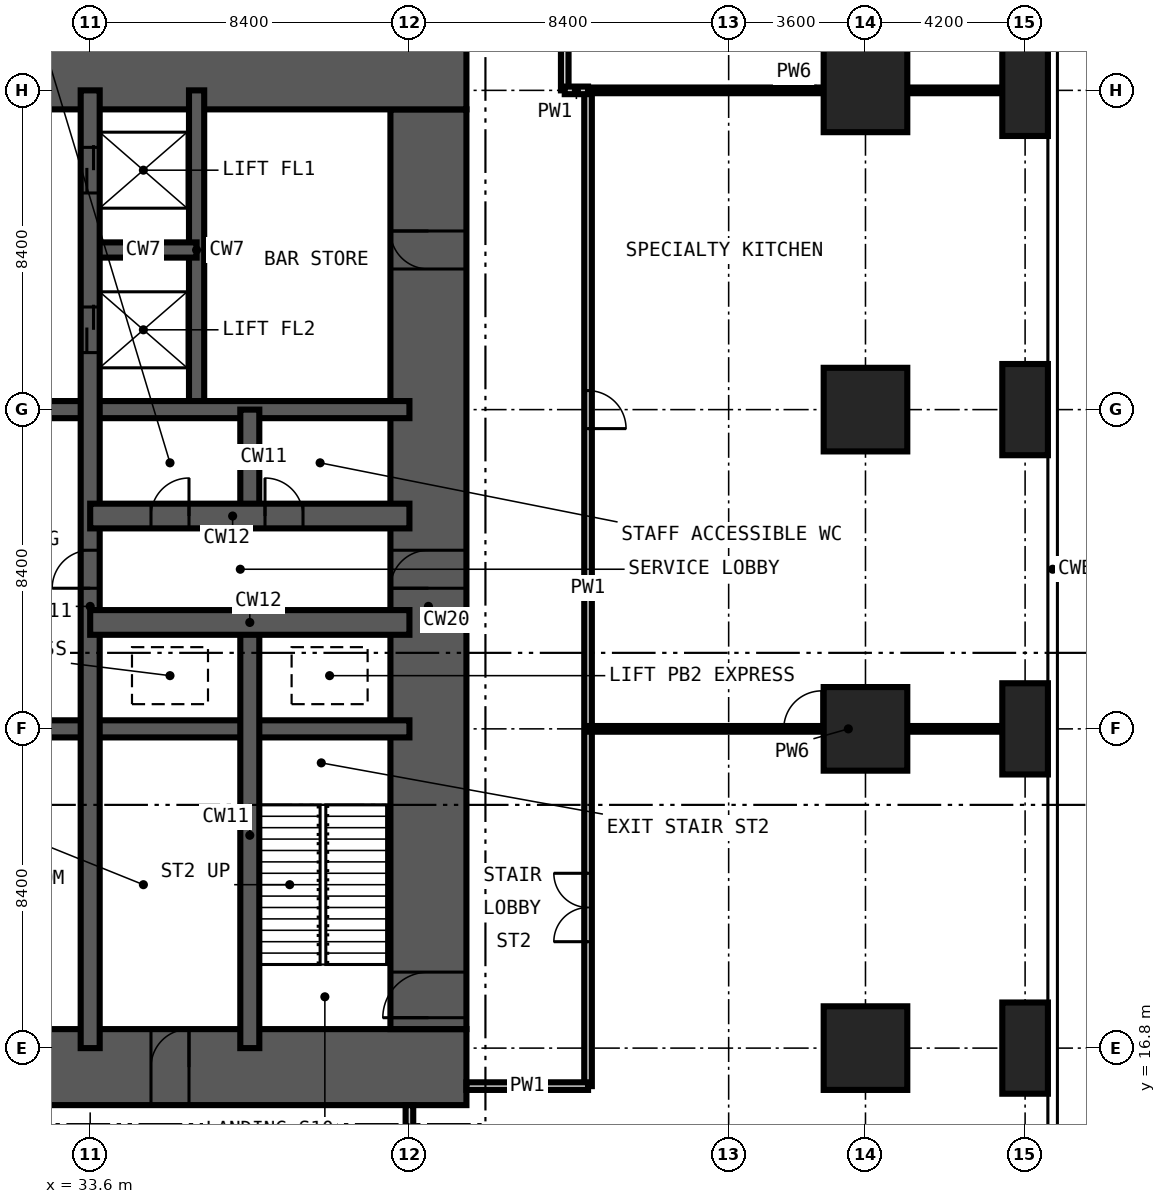
"""IFC4 building model, lengths in metres.
Left out: names, types, materials, properties, quantities, classifications, styles, units other than length and angle.
Written with IfcOpenShell. Run it as: python <this file> out.ifc"""

import sys

from ifc_helpers import new_model, si_unit, direction, frame, frame_2d, origin, origin_2d, place, context, subcontext, project, spatial, rectangle, extrude, element, fill, save


model = new_model("IFC4")
c1 = context("Model", 3, precision=1e-05, world=origin(), true_north=direction((0.0, 1.0)))
c2 = subcontext(c1, "Body", "Model", "MODEL_VIEW")
j1 = project(units=[si_unit("LENGTHUNIT", "METRE"), si_unit("PLANEANGLEUNIT", "RADIAN")], contexts=[c1])
p1 = place(None, origin())
s1 = spatial("IfcSite", under=j1, at=p1, CompositionType="ELEMENT")
p2 = place(p1, origin())
s2 = spatial("IfcBuilding", under=s1, at=p2, CompositionType="ELEMENT")
p3 = place(p2, frame((0.0, 0.0, 17.0)))
s3 = spatial("IfcBuildingStorey", under=s2, at=p3, CompositionType="ELEMENT", Elevation=17.0)
for number, where, z_axis, x_axis in (
    (1, (54.0, 16.8, -0.3), (0.0, 0.0, 1.0), (1.0, 0.0, 0.0)),
    (2, (54.0, 25.2, -0.3), (0.0, 0.0, 1.0), (1.0, 0.0, 0.0)),
    (3, (54.0, 33.6, -0.3), (0.0, 0.0, 1.0), (1.0, 0.0, 0.0)),
    (4, (54.0, 42.0, -0.3), (0.0, 0.0, 1.0), (1.0, 0.0, 0.0)),
):
    element("IfcColumn", number, at=place(p3, frame(where, z_axis=z_axis, x_axis=x_axis)), inside=s3, PredefinedType="COLUMN", context=c2, shape_type="SweptSolid", body=[
        extrude(rectangle(XDim=2.2, YDim=2.2, at=origin_2d()), origin(), (0.0, 0.0, 1.0), 4.95),
    ])
for number, where, z_axis, x_axis in (
    (5, (58.2, 16.8, -0.3), (0.0, 0.0, 1.0), (1.0, 0.0, 0.0)),
    (6, (58.2, 25.2, -0.3), (0.0, 0.0, 1.0), (1.0, 0.0, 0.0)),
    (7, (58.2, 33.6, -0.3), (0.0, 0.0, 1.0), (1.0, 0.0, 0.0)),
    (8, (58.2, 42.0, -0.3), (0.0, 0.0, 1.0), (1.0, 0.0, 0.0)),
):
    element("IfcColumn", number, at=place(p3, frame(where, z_axis=z_axis, x_axis=x_axis)), inside=s3, PredefinedType="COLUMN", context=c2, shape_type="SweptSolid", body=[
        extrude(rectangle(XDim=1.2, YDim=2.4, at=origin_2d()), origin(), (0.0, 0.0, 1.0), 4.95),
    ])
p4 = place(p3, frame((15.3, 16.3, -0.3), z_axis=(0.0, 0.0, 1.0), x_axis=(1.0, 0.0, 0.0)))
e9 = element("IfcWall", 9, at=p4, inside=s3, PredefinedType="SHEAR", context=c2, shape_type="SweptSolid", body=[
    extrude(rectangle(XDim=28.2, YDim=2.0, at=frame_2d((14.1, 0.0))), origin(), (0.0, 0.0, 1.0), 4.95),
])
p5 = place(p4, frame((13.6, 0.0, 0.3)))
e10 = element("IfcOpeningElement", 10, at=p5, cuts=e9, PredefinedType="OPENING", context=c2, shape_type="SweptSolid", body=[
    extrude(rectangle(XDim=1.0, YDim=2.1, at=frame_2d((0.5, 1.05))), frame((0.0, 1.01, 0.0), z_axis=(0.0, -1.0, 0.0), x_axis=(1.0, 0.0, 0.0)), (0.0, 0.0, 1.0), 2.02),
])
p6 = place(p4, frame((19.9, 0.0, 0.3)))
e11 = element("IfcOpeningElement", 11, at=p6, cuts=e9, PredefinedType="OPENING", context=c2, shape_type="SweptSolid", body=[
    extrude(rectangle(XDim=1.0, YDim=2.1, at=frame_2d((0.5, 1.05))), frame((0.0, 1.01, 0.0), z_axis=(0.0, -1.0, 0.0), x_axis=(1.0, 0.0, 0.0)), (0.0, 0.0, 1.0), 2.02),
])
p7 = place(p3, frame((42.5, 17.3, -0.3), z_axis=(0.0, 0.0, 1.0), x_axis=(0.0, 1.0, 0.0)))
e12 = element("IfcWall", 12, at=p7, inside=s3, PredefinedType="SHEAR", context=c2, shape_type="SweptSolid", body=[
    extrude(rectangle(XDim=24.2, YDim=2.0, at=frame_2d((12.1, 0.0))), origin(), (0.0, 0.0, 1.0), 4.95),
])
p8 = place(p7, frame((0.3, 0.0, 0.3)))
e13 = element("IfcOpeningElement", 13, at=p8, cuts=e12, PredefinedType="OPENING", context=c2, shape_type="SweptSolid", body=[
    extrude(rectangle(XDim=1.2, YDim=2.2, at=frame_2d((0.6, 1.1))), frame((0.0, 1.01, 0.0), z_axis=(0.0, -1.0, 0.0), x_axis=(1.0, 0.0, 0.0)), (0.0, 0.0, 1.0), 2.02),
])
p9 = place(p7, frame((11.6, 0.0, 0.3)))
e14 = element("IfcOpeningElement", 14, at=p9, cuts=e12, PredefinedType="OPENING", context=c2, shape_type="SweptSolid", body=[
    extrude(rectangle(XDim=1.0, YDim=2.1, at=frame_2d((0.5, 1.05))), frame((0.0, 1.01, 0.0), z_axis=(0.0, -1.0, 0.0), x_axis=(1.0, 0.0, 0.0)), (0.0, 0.0, 1.0), 2.02),
])
p10 = place(p7, frame((20.0, 0.0, 0.3)))
e15 = element("IfcOpeningElement", 15, at=p10, cuts=e12, PredefinedType="OPENING", context=c2, shape_type="SweptSolid", body=[
    extrude(rectangle(XDim=1.0, YDim=2.1, at=frame_2d((0.5, 1.05))), frame((0.0, 1.01, 0.0), z_axis=(0.0, -1.0, 0.0), x_axis=(1.0, 0.0, 0.0)), (0.0, 0.0, 1.0), 2.02),
])
p11 = place(p3, frame((43.5, 42.5, -0.3), z_axis=(0.0, 0.0, 1.0), x_axis=(-1.0, 0.0, 0.0)))
e16 = element("IfcWall", 16, at=p11, inside=s3, PredefinedType="SHEAR", context=c2, shape_type="SweptSolid", body=[
    extrude(rectangle(XDim=28.2, YDim=2.0, at=frame_2d((14.1, 0.0))), origin(), (0.0, 0.0, 1.0), 4.95),
])
p12 = place(p11, frame((22.0, 0.0, 0.3)))
e17 = element("IfcOpeningElement", 17, at=p12, cuts=e16, PredefinedType="OPENING", context=c2, shape_type="SweptSolid", body=[
    extrude(rectangle(XDim=1.0, YDim=2.1, at=frame_2d((0.5, 1.05))), frame((0.0, 1.01, 0.0), z_axis=(0.0, -1.0, 0.0), x_axis=(1.0, 0.0, 0.0)), (0.0, 0.0, 1.0), 2.02),
])
p13 = place(p11, frame((11.4, 0.0, 0.3)))
e18 = element("IfcOpeningElement", 18, at=p13, cuts=e16, PredefinedType="OPENING", context=c2, shape_type="SweptSolid", body=[
    extrude(rectangle(XDim=1.2, YDim=2.2, at=frame_2d((0.6, 1.1))), frame((0.0, 1.01, 0.0), z_axis=(0.0, -1.0, 0.0), x_axis=(1.0, 0.0, 0.0)), (0.0, 0.0, 1.0), 2.02),
])
p14 = place(p3, frame((36.4, 33.6, -0.3), z_axis=(0.0, 0.0, 1.0), x_axis=(0.0, 1.0, 0.0)))
e19 = element("IfcWall", 19, at=p14, inside=s3, PredefinedType="SHEAR", context=c2, shape_type="SweptSolid", body=[
    extrude(rectangle(XDim=8.4, YDim=0.4, at=frame_2d((4.2, 0.0))), origin(), (0.0, 0.0, 1.0), 4.95),
])
p15 = place(p3, frame((33.6, 37.8, -0.3), z_axis=(0.0, 0.0, 1.0), x_axis=(1.0, 0.0, 0.0)))
e20 = element("IfcWall", 20, at=p15, inside=s3, PredefinedType="SHEAR", context=c2, shape_type="SweptSolid", body=[
    extrude(rectangle(XDim=2.8, YDim=0.4, at=frame_2d((1.4, 0.0))), origin(), (0.0, 0.0, 1.0), 4.95),
])
for number, where, z_axis, x_axis in (
    (21, (16.8, 25.2, -0.3), (0.0, 0.0, 1.0), (1.0, 0.0, 0.0)),
    (22, (16.8, 33.6, -0.3), (0.0, 0.0, 1.0), (1.0, 0.0, 0.0)),
):
    element("IfcWall", number, at=place(p3, frame(where, z_axis=z_axis, x_axis=x_axis)), inside=s3, PredefinedType="SHEAR", context=c2, shape_type="SweptSolid", body=[
        extrude(rectangle(XDim=25.2, YDim=0.45, at=frame_2d((12.6, 0.0))), origin(), (0.0, 0.0, 1.0), 4.95),
    ])
p16 = place(p3, frame((33.6, 16.8, -0.3), z_axis=(0.0, 0.0, 1.0), x_axis=(0.0, 1.0, 0.0)))
e23 = element("IfcWall", 23, at=p16, inside=s3, PredefinedType="SHEAR", context=c2, shape_type="SweptSolid", body=[
    extrude(rectangle(XDim=25.2, YDim=0.5, at=frame_2d((12.6, 0.0))), origin(), (0.0, 0.0, 1.0), 4.95),
])
p17 = place(p16, frame((22.5, 0.0, 0.3)))
e24 = element("IfcOpeningElement", 24, at=p17, cuts=e23, PredefinedType="OPENING", context=c2, shape_type="SweptSolid", body=[
    extrude(rectangle(XDim=1.2, YDim=2.2, at=frame_2d((0.6, 1.1))), frame((0.0, 0.26, 0.0), z_axis=(0.0, -1.0, 0.0), x_axis=(1.0, 0.0, 0.0)), (0.0, 0.0, 1.0), 0.52),
])
p18 = place(p16, frame((18.3, 0.0, 0.3)))
e25 = element("IfcOpeningElement", 25, at=p18, cuts=e23, PredefinedType="OPENING", context=c2, shape_type="SweptSolid", body=[
    extrude(rectangle(XDim=1.2, YDim=2.2, at=frame_2d((0.6, 1.1))), frame((0.0, 0.26, 0.0), z_axis=(0.0, -1.0, 0.0), x_axis=(1.0, 0.0, 0.0)), (0.0, 0.0, 1.0), 0.52),
])
p19 = place(p16, frame((12.1, 0.0, 0.3)))
e26 = element("IfcOpeningElement", 26, at=p19, cuts=e23, PredefinedType="OPENING", context=c2, shape_type="SweptSolid", body=[
    extrude(rectangle(XDim=1.0, YDim=2.1, at=frame_2d((0.5, 1.05))), frame((0.0, 0.26, 0.0), z_axis=(0.0, -1.0, 0.0), x_axis=(1.0, 0.0, 0.0)), (0.0, 0.0, 1.0), 0.52),
])
p20 = place(p3, frame((37.8, 16.8, -0.3), z_axis=(0.0, 0.0, 1.0), x_axis=(0.0, 1.0, 0.0)))
e27 = element("IfcWall", 27, at=p20, inside=s3, PredefinedType="SHEAR", context=c2, shape_type="SweptSolid", body=[
    extrude(rectangle(XDim=11.2, YDim=0.5, at=frame_2d((5.6, 0.0))), origin(), (0.0, 0.0, 1.0), 4.95),
])
p21 = place(p3, frame((37.8, 30.8, -0.3), z_axis=(0.0, 0.0, 1.0), x_axis=(0.0, 1.0, 0.0)))
e28 = element("IfcWall", 28, at=p21, inside=s3, PredefinedType="SHEAR", context=c2, shape_type="SweptSolid", body=[
    extrude(rectangle(XDim=2.8, YDim=0.5, at=frame_2d((1.4, 0.0))), origin(), (0.0, 0.0, 1.0), 4.95),
])
p22 = place(p3, frame((33.6, 28.0, -0.3), z_axis=(0.0, 0.0, 1.0), x_axis=(1.0, 0.0, 0.0)))
e29 = element("IfcWall", 29, at=p22, inside=s3, PredefinedType="SHEAR", context=c2, shape_type="SweptSolid", body=[
    extrude(rectangle(XDim=8.4, YDim=0.65, at=frame_2d((4.2, 0.0))), origin(), (0.0, 0.0, 1.0), 4.95),
])
p23 = place(p3, frame((33.6, 30.8, -0.3), z_axis=(0.0, 0.0, 1.0), x_axis=(1.0, 0.0, 0.0)))
e30 = element("IfcWall", 30, at=p23, inside=s3, PredefinedType="SHEAR", context=c2, shape_type="SweptSolid", body=[
    extrude(rectangle(XDim=8.4, YDim=0.65, at=frame_2d((4.2, 0.0))), origin(), (0.0, 0.0, 1.0), 4.95),
])
p24 = place(p23, frame((1.6, 0.0, 0.3)))
e31 = element("IfcOpeningElement", 31, at=p24, cuts=e30, PredefinedType="OPENING", context=c2, shape_type="SweptSolid", body=[
    extrude(rectangle(XDim=1.0, YDim=2.1, at=frame_2d((0.5, 1.05))), frame((0.0, 0.335, 0.0), z_axis=(0.0, -1.0, 0.0), x_axis=(1.0, 0.0, 0.0)), (0.0, 0.0, 1.0), 0.67),
])
p25 = place(p23, frame((4.6, 0.0, 0.3)))
e32 = element("IfcOpeningElement", 32, at=p25, cuts=e30, PredefinedType="OPENING", context=c2, shape_type="SweptSolid", body=[
    extrude(rectangle(XDim=1.0, YDim=2.1, at=frame_2d((0.5, 1.05))), frame((0.0, 0.335, 0.0), z_axis=(0.0, -1.0, 0.0), x_axis=(1.0, 0.0, 0.0)), (0.0, 0.0, 1.0), 0.67),
])
p26 = place(p3, frame((42.0, 12.1, 0.0), z_axis=(0.0, 0.0, 1.0), x_axis=(0.0, 1.0, 0.0)))
e33 = element("IfcWall", 33, at=p26, inside=s3, PredefinedType="PARTITIONING", context=c2, shape_type="SweptSolid", body=[
    extrude(rectangle(XDim=3.2, YDim=0.2, at=frame_2d((1.6, 0.0))), origin(), (0.0, 0.0, 1.0), 4.65),
])
p27 = place(p3, frame((46.087, 42.0, 0.0), z_axis=(0.0, 0.0, 1.0), x_axis=(0.0, 1.0, 0.0)))
e34 = element("IfcWall", 34, at=p27, inside=s3, PredefinedType="PARTITIONING", context=c2, shape_type="SweptSolid", body=[
    extrude(rectangle(XDim=4.7, YDim=0.2, at=frame_2d((2.35, 0.0))), origin(), (0.0, 0.0, 1.0), 4.65),
])
p28 = place(p27, frame((1.45, 0.0, 0.0)))
e35 = element("IfcOpeningElement", 35, at=p28, cuts=e34, PredefinedType="OPENING", context=c2, shape_type="SweptSolid", body=[
    extrude(rectangle(XDim=1.8, YDim=2.4, at=frame_2d((0.9, 1.2))), frame((0.0, 0.11, 0.0), z_axis=(0.0, -1.0, 0.0), x_axis=(1.0, 0.0, 0.0)), (0.0, 0.0, 1.0), 0.22),
])
p29 = place(p3, frame((46.7, 15.8, 0.0), z_axis=(0.0, 0.0, 1.0), x_axis=(0.0, 1.0, 0.0)))
e36 = element("IfcWall", 36, at=p29, inside=s3, PredefinedType="PARTITIONING", context=c2, shape_type="SweptSolid", body=[
    extrude(rectangle(XDim=26.2, YDim=0.2, at=frame_2d((13.1, 0.0))), origin(), (0.0, 0.0, 1.0), 4.65),
])
p30 = place(p29, frame((3.8, 0.0, 0.0)))
e37 = element("IfcOpeningElement", 37, at=p30, cuts=e36, PredefinedType="OPENING", context=c2, shape_type="SweptSolid", body=[
    extrude(rectangle(XDim=1.8, YDim=2.4, at=frame_2d((0.9, 1.2))), frame((0.0, 0.11, 0.0), z_axis=(0.0, -1.0, 0.0), x_axis=(1.0, 0.0, 0.0)), (0.0, 0.0, 1.0), 0.22),
])
p31 = place(p29, frame((17.3, 0.0, 0.0)))
e38 = element("IfcOpeningElement", 38, at=p31, cuts=e36, PredefinedType="OPENING", context=c2, shape_type="SweptSolid", body=[
    extrude(rectangle(XDim=1.0, YDim=2.1, at=frame_2d((0.5, 1.05))), frame((0.0, 0.11, 0.0), z_axis=(0.0, -1.0, 0.0), x_axis=(1.0, 0.0, 0.0)), (0.0, 0.0, 1.0), 0.22),
])
p32 = place(p3, frame((43.5, 15.8, 0.0), z_axis=(0.0, 0.0, 1.0), x_axis=(1.0, 0.0, 0.0)))
e39 = element("IfcWall", 39, at=p32, inside=s3, PredefinedType="PARTITIONING", context=c2, shape_type="SweptSolid", body=[
    extrude(rectangle(XDim=3.2, YDim=0.2, at=frame_2d((1.6, 0.0))), origin(), (0.0, 0.0, 1.0), 4.65),
])
p33 = place(p3, frame((46.7, 42.0, 0.0), z_axis=(0.0, 0.0, 1.0), x_axis=(-1.0, 0.0, 0.0)))
e40 = element("IfcWall", 40, at=p33, inside=s3, PredefinedType="PARTITIONING", context=c2, shape_type="SweptSolid", body=[
    extrude(rectangle(XDim=0.613, YDim=0.2, at=frame_2d((0.307, 0.0))), origin(), (0.0, 0.0, 1.0), 4.65),
])
p34 = place(p3, frame((46.7, 25.2, 0.0), z_axis=(0.0, 0.0, 1.0), x_axis=(1.0, 0.0, 0.0)))
e41 = element("IfcWall", 41, at=p34, inside=s3, PredefinedType="PARTITIONING", context=c2, shape_type="SweptSolid", body=[
    extrude(rectangle(XDim=12.1, YDim=0.15, at=frame_2d((6.05, 0.0))), origin(), (0.0, 0.0, 1.0), 4.65),
])
p35 = place(p34, frame((5.15, 0.0, 0.0)))
e42 = element("IfcOpeningElement", 42, at=p35, cuts=e41, PredefinedType="OPENING", context=c2, shape_type="SweptSolid", body=[
    extrude(rectangle(XDim=1.0, YDim=2.1, at=frame_2d((0.5, 1.05))), frame((0.0, 0.085, 0.0), z_axis=(0.0, -1.0, 0.0), x_axis=(1.0, 0.0, 0.0)), (0.0, 0.0, 1.0), 0.17),
])
p36 = place(p3, frame((46.7, 42.0, 0.0), z_axis=(0.0, 0.0, 1.0), x_axis=(1.0, 0.0, 0.0)))
e43 = element("IfcWall", 43, at=p36, inside=s3, PredefinedType="PARTITIONING", context=c2, shape_type="SweptSolid", body=[
    extrude(rectangle(XDim=12.1, YDim=0.15, at=frame_2d((6.05, 0.0))), origin(), (0.0, 0.0, 1.0), 4.65),
])
p37 = place(p8, origin())
e44 = element("IfcDoor", 44, at=p37, inside=s3, OperationType="SINGLE_SWING_LEFT", PredefinedType="DOOR", context=c2, shape_type="SweptSolid", body=[
    extrude(rectangle(XDim=1.2, YDim=2.2, at=frame_2d((0.6, 1.1))), frame((0.0, 0.025, 0.0), z_axis=(0.0, -1.0, 0.0), x_axis=(1.0, 0.0, 0.0)), (0.0, 0.0, 1.0), 0.05),
])
fill(e13, e44)
p38 = place(p17, origin())
e45 = element("IfcDoor", 45, at=p38, inside=s3, OperationType="DOUBLE_DOOR_SLIDING", PredefinedType="DOOR", context=c2, shape_type="SweptSolid", body=[
    extrude(rectangle(XDim=1.2, YDim=2.2, at=frame_2d((0.6, 1.1))), frame((0.0, 0.025, 0.0), z_axis=(0.0, -1.0, 0.0), x_axis=(1.0, 0.0, 0.0)), (0.0, 0.0, 1.0), 0.05),
])
fill(e24, e45)
p39 = place(p18, origin())
e46 = element("IfcDoor", 46, at=p39, inside=s3, OperationType="DOUBLE_DOOR_SLIDING", PredefinedType="DOOR", context=c2, shape_type="SweptSolid", body=[
    extrude(rectangle(XDim=1.2, YDim=2.2, at=frame_2d((0.6, 1.1))), frame((0.0, 0.025, 0.0), z_axis=(0.0, -1.0, 0.0), x_axis=(1.0, 0.0, 0.0)), (0.0, 0.0, 1.0), 0.05),
])
fill(e25, e46)
p40 = place(p19, origin())
e47 = element("IfcDoor", 47, at=p40, inside=s3, OperationType="SINGLE_SWING_LEFT", PredefinedType="DOOR", context=c2, shape_type="SweptSolid", body=[
    extrude(rectangle(XDim=1.0, YDim=2.1, at=frame_2d((0.5, 1.05))), frame((0.0, 0.025, 0.0), z_axis=(0.0, -1.0, 0.0), x_axis=(1.0, 0.0, 0.0)), (0.0, 0.0, 1.0), 0.05),
])
fill(e26, e47)
p41 = place(p24, origin())
e48 = element("IfcDoor", 48, at=p41, inside=s3, OperationType="SINGLE_SWING_RIGHT", PredefinedType="DOOR", context=c2, shape_type="SweptSolid", body=[
    extrude(rectangle(XDim=1.0, YDim=2.1, at=frame_2d((0.5, 1.05))), frame((0.0, 0.025, 0.0), z_axis=(0.0, -1.0, 0.0), x_axis=(1.0, 0.0, 0.0)), (0.0, 0.0, 1.0), 0.05),
])
fill(e31, e48)
p42 = place(p25, origin())
e49 = element("IfcDoor", 49, at=p42, inside=s3, OperationType="SINGLE_SWING_LEFT", PredefinedType="DOOR", context=c2, shape_type="SweptSolid", body=[
    extrude(rectangle(XDim=1.0, YDim=2.1, at=frame_2d((0.5, 1.05))), frame((0.0, 0.025, 0.0), z_axis=(0.0, -1.0, 0.0), x_axis=(1.0, 0.0, 0.0)), (0.0, 0.0, 1.0), 0.05),
])
fill(e32, e49)
p43 = place(p9, origin())
e50 = element("IfcDoor", 50, at=p43, inside=s3, OperationType="SINGLE_SWING_LEFT", PredefinedType="DOOR", context=c2, shape_type="SweptSolid", body=[
    extrude(rectangle(XDim=1.0, YDim=2.1, at=frame_2d((0.5, 1.05))), frame((0.0, 0.025, 0.0), z_axis=(0.0, -1.0, 0.0), x_axis=(1.0, 0.0, 0.0)), (0.0, 0.0, 1.0), 0.05),
])
fill(e14, e50)
p44 = place(p10, origin())
e51 = element("IfcDoor", 51, at=p44, inside=s3, OperationType="SINGLE_SWING_RIGHT", PredefinedType="DOOR", context=c2, shape_type="SweptSolid", body=[
    extrude(rectangle(XDim=1.0, YDim=2.1, at=frame_2d((0.5, 1.05))), frame((0.0, 0.025, 0.0), z_axis=(0.0, -1.0, 0.0), x_axis=(1.0, 0.0, 0.0)), (0.0, 0.0, 1.0), 0.05),
])
fill(e15, e51)
p45 = place(p6, origin())
e52 = element("IfcDoor", 52, at=p45, inside=s3, OperationType="SINGLE_SWING_RIGHT", PredefinedType="DOOR", context=c2, shape_type="SweptSolid", body=[
    extrude(rectangle(XDim=1.0, YDim=2.1, at=frame_2d((0.5, 1.05))), frame((0.0, 0.025, 0.0), z_axis=(0.0, -1.0, 0.0), x_axis=(1.0, 0.0, 0.0)), (0.0, 0.0, 1.0), 0.05),
])
fill(e11, e52)
p46 = place(p30, origin())
e53 = element("IfcDoor", 53, at=p46, inside=s3, OperationType="DOUBLE_DOOR_DOUBLE_SWING", PredefinedType="DOOR", context=c2, shape_type="SweptSolid", body=[
    extrude(rectangle(XDim=1.8, YDim=2.4, at=frame_2d((0.9, 1.2))), frame((0.0, 0.025, 0.0), z_axis=(0.0, -1.0, 0.0), x_axis=(1.0, 0.0, 0.0)), (0.0, 0.0, 1.0), 0.05),
])
fill(e37, e53)
p47 = place(p35, origin())
e54 = element("IfcDoor", 54, at=p47, inside=s3, OperationType="SINGLE_SWING_RIGHT", PredefinedType="DOOR", context=c2, shape_type="SweptSolid", body=[
    extrude(rectangle(XDim=1.0, YDim=2.1, at=frame_2d((0.5, 1.05))), frame((0.0, 0.025, 0.0), z_axis=(0.0, -1.0, 0.0), x_axis=(1.0, 0.0, 0.0)), (0.0, 0.0, 1.0), 0.05),
])
fill(e42, e54)
p48 = place(p31, frame((1.0, 0.0, 0.0), z_axis=(0.0, 0.0, 1.0), x_axis=(-1.0, 0.0, 0.0)))
e55 = element("IfcDoor", 55, at=p48, inside=s3, OperationType="SINGLE_SWING_RIGHT", PredefinedType="DOOR", context=c2, shape_type="SweptSolid", body=[
    extrude(rectangle(XDim=1.0, YDim=2.1, at=frame_2d((0.5, 1.05))), frame((0.0, 0.025, 0.0), z_axis=(0.0, -1.0, 0.0), x_axis=(1.0, 0.0, 0.0)), (0.0, 0.0, 1.0), 0.05),
])
fill(e38, e55)
save(model, sys.argv[1])
